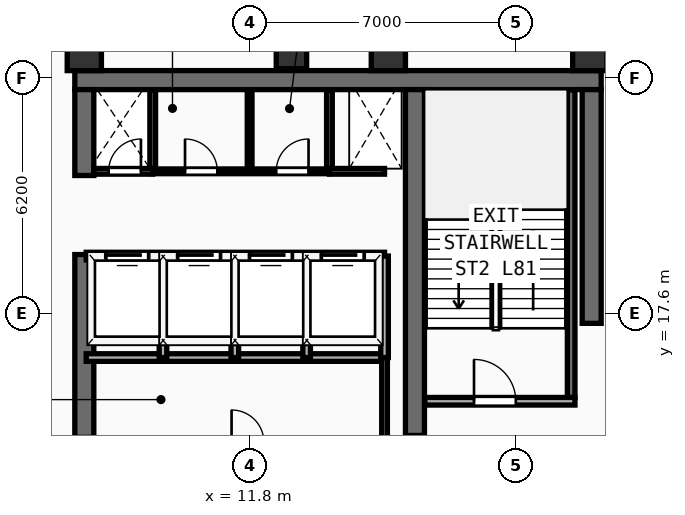
"""IFC4 building model, lengths in metres.
Left out: names, types, materials, properties, quantities, classifications, styles, units other than length and angle.
Written with IfcOpenShell. Run it as: python <this file> out.ifc"""

import sys

from ifc_helpers import new_model, si_unit, direction, frame, frame_2d, origin, origin_2d, place, context, subcontext, project, spatial, rectangle, extrude, element, fill, save


model = new_model("IFC4")
c1 = context("Model", 3, precision=1e-05, world=origin(), true_north=direction((0.0, 1.0)))
c2 = subcontext(c1, "Body", "Model", "MODEL_VIEW")
j1 = project(units=[si_unit("LENGTHUNIT", "METRE"), si_unit("PLANEANGLEUNIT", "RADIAN")], contexts=[c1])
p1 = place(None, origin())
s1 = spatial("IfcSite", under=j1, at=p1, CompositionType="ELEMENT")
p2 = place(p1, origin())
s2 = spatial("IfcBuilding", under=s1, at=p2, CompositionType="ELEMENT")
p3 = place(p2, frame((0.0, 0.0, 316.0)))
s3 = spatial("IfcBuildingStorey", under=s2, at=p3, CompositionType="ELEMENT", Elevation=316.0)
p4 = place(p3, frame((7.2, 23.75, 0.0), z_axis=(0.0, 0.0, 1.0), x_axis=(1.0, 0.0, 0.0)))
e1 = element("IfcWall", 1, at=p4, inside=s3, PredefinedType="SHEAR", context=c2, shape_type="SweptSolid", body=[
    extrude(rectangle(XDim=13.85, YDim=0.5, at=frame_2d((6.925, 0.0))), origin(), (0.0, 0.0, 1.0), 3.56),
])
p5 = place(p3, frame((7.45, 14.35, 0.0), z_axis=(0.0, 0.0, 1.0), x_axis=(0.0, 1.0, 0.0)))
e2 = element("IfcWall", 2, at=p5, inside=s3, PredefinedType="SHEAR", context=c2, shape_type="SweptSolid", body=[
    extrude(rectangle(XDim=4.81, YDim=0.5, at=frame_2d((2.405, 0.0))), origin(), (0.0, 0.0, 1.0), 3.56),
])
p6 = place(p3, frame((7.45, 21.24, 0.0), z_axis=(0.0, 0.0, 1.0), x_axis=(0.0, 1.0, 0.0)))
e3 = element("IfcWall", 3, at=p6, inside=s3, PredefinedType="SHEAR", context=c2, shape_type="SweptSolid", body=[
    extrude(rectangle(XDim=2.26, YDim=0.5, at=frame_2d((1.13, 0.0))), origin(), (0.0, 0.0, 1.0), 3.56),
])
p7 = place(p3, frame((20.8, 17.35, 0.0), z_axis=(0.0, 0.0, 1.0), x_axis=(0.0, 1.0, 0.0)))
e4 = element("IfcWall", 4, at=p7, inside=s3, PredefinedType="SHEAR", context=c2, shape_type="SweptSolid", body=[
    extrude(rectangle(XDim=6.15, YDim=0.5, at=frame_2d((3.075, 0.0))), origin(), (0.0, 0.0, 1.0), 3.56),
])
p8 = place(p3, frame((16.15, 14.4, 0.0), z_axis=(0.0, 0.0, 1.0), x_axis=(0.0, 1.0, 0.0)))
e5 = element("IfcWall", 5, at=p8, inside=s3, PredefinedType="SHEAR", context=c2, shape_type="SweptSolid", body=[
    extrude(rectangle(XDim=9.1, YDim=0.5, at=frame_2d((4.55, 0.0))), origin(), (0.0, 0.0, 1.0), 3.56),
])
for number, where, z_axis, x_axis in (
    (6, (7.45, 24.45, 0.0), (0.0, 0.0, 1.0), (1.0, 0.0, 0.0)),
    (7, (15.45, 24.45, 0.0), (0.0, 0.0, 1.0), (1.0, 0.0, 0.0)),
    (8, (20.75, 24.45, 0.0), (0.0, 0.0, 1.0), (1.0, 0.0, 0.0)),
):
    element("IfcColumn", number, at=place(p3, frame(where, z_axis=z_axis, x_axis=x_axis)), inside=s3, PredefinedType="COLUMN", context=c2, shape_type="SweptSolid", body=[
        extrude(rectangle(XDim=0.9, YDim=0.9, at=origin_2d()), origin(), (0.0, 0.0, 1.0), 3.56),
    ])
p9 = place(p3, frame((12.9, 24.45, 0.0), z_axis=(0.0, 0.0, 1.0), x_axis=(1.0, 0.0, 0.0)))
e9 = element("IfcColumn", 9, at=p9, inside=s3, PredefinedType="COLUMN", context=c2, shape_type="SweptSolid", body=[
    extrude(rectangle(XDim=0.8, YDim=0.8, at=origin_2d()), origin(), (0.0, 0.0, 1.0), 3.56),
])
p10 = place(p3, frame((27.538, 19.628, 0.0), z_axis=(0.0, 0.0, 1.0), x_axis=(-0.707106781187, 0.707106781187, 0.0)))
e10 = element("IfcWall", 10, at=p10, inside=s3, PredefinedType="SOLIDWALL", context=c2, shape_type="SweptSolid", body=[
    extrude(rectangle(XDim=9.207, YDim=0.28, at=frame_2d((4.603, 0.0))), origin(), (0.0, 0.0, 1.0), 3.56),
])
p11 = place(p3, frame((20.26, 15.4, 0.0), z_axis=(0.0, 0.0, 1.0), x_axis=(0.0, 1.0, 0.0)))
e11 = element("IfcWall", 11, at=p11, inside=s3, PredefinedType="SHEAR", context=c2, shape_type="SweptSolid", body=[
    extrude(rectangle(XDim=8.09, YDim=0.2, at=frame_2d((4.045, 0.0))), origin(), (0.0, 0.0, 1.0), 3.56),
])
p12 = place(p3, frame((16.41, 15.3, 0.0), z_axis=(0.0, 0.0, 1.0), x_axis=(1.0, 0.0, 0.0)))
e12 = element("IfcWall", 12, at=p12, inside=s3, PredefinedType="PARTITIONING", context=c2, shape_type="SweptSolid", body=[
    extrude(rectangle(XDim=3.95, YDim=0.2, at=frame_2d((1.975, 0.0))), origin(), (0.0, 0.0, 1.0), 3.56),
])
p13 = place(p12, frame((1.294, 0.0, 0.0)))
e13 = element("IfcOpeningElement", 13, at=p13, cuts=e12, PredefinedType="OPENING", context=c2, shape_type="SweptSolid", body=[
    extrude(rectangle(XDim=1.1, YDim=2.2, at=frame_2d((0.55, 1.1))), frame((0.0, 0.11, 0.0), z_axis=(0.0, -1.0, 0.0), x_axis=(1.0, 0.0, 0.0)), (0.0, 0.0, 1.0), 0.22),
])
p14 = place(p3, frame((7.5, 16.45, 0.0), z_axis=(0.0, 0.0, 1.0), x_axis=(1.0, 0.0, 0.0)))
e14 = element("IfcWall", 14, at=p14, inside=s3, PredefinedType="PARTITIONING", context=c2, shape_type="SweptSolid", body=[
    extrude(rectangle(XDim=7.85, YDim=0.2, at=frame_2d((3.925, 0.0))), origin(), (0.0, 0.0, 1.0), 3.56),
])
p15 = place(p3, frame((15.35, 14.22, 0.0), z_axis=(0.0, 0.0, 1.0), x_axis=(0.0, 1.0, 0.0)))
e15 = element("IfcWall", 15, at=p15, inside=s3, PredefinedType="PARTITIONING", context=c2, shape_type="SweptSolid", body=[
    extrude(rectangle(XDim=2.23, YDim=0.15, at=frame_2d((1.115, 0.0))), origin(), (0.0, 0.0, 1.0), 3.56),
])
p16 = place(p3, frame((7.5, 19.12, 0.0), z_axis=(0.0, 0.0, 1.0), x_axis=(1.0, 0.0, 0.0)))
e16 = element("IfcWall", 16, at=p16, inside=s3, PredefinedType="PARTITIONING", context=c2, shape_type="SweptSolid", body=[
    extrude(rectangle(XDim=7.85, YDim=0.2, at=frame_2d((3.925, 0.0))), origin(), (0.0, 0.0, 1.0), 3.56),
])
p17 = place(p16, frame((0.53, 0.0, 0.0)))
e17 = element("IfcOpeningElement", 17, at=p17, cuts=e16, PredefinedType="OPENING", context=c2, shape_type="SweptSolid", body=[
    extrude(rectangle(XDim=1.1, YDim=2.2, at=frame_2d((0.55, 1.1))), frame((0.0, 0.11, 0.0), z_axis=(0.0, -1.0, 0.0), x_axis=(1.0, 0.0, 0.0)), (0.0, 0.0, 1.0), 0.22),
])
p18 = place(p16, frame((2.42, 0.0, 0.0)))
e18 = element("IfcOpeningElement", 18, at=p18, cuts=e16, PredefinedType="OPENING", context=c2, shape_type="SweptSolid", body=[
    extrude(rectangle(XDim=1.1, YDim=2.2, at=frame_2d((0.55, 1.1))), frame((0.0, 0.11, 0.0), z_axis=(0.0, -1.0, 0.0), x_axis=(1.0, 0.0, 0.0)), (0.0, 0.0, 1.0), 0.22),
])
p19 = place(p16, frame((4.31, 0.0, 0.0)))
e19 = element("IfcOpeningElement", 19, at=p19, cuts=e16, PredefinedType="OPENING", context=c2, shape_type="SweptSolid", body=[
    extrude(rectangle(XDim=1.1, YDim=2.2, at=frame_2d((0.55, 1.1))), frame((0.0, 0.11, 0.0), z_axis=(0.0, -1.0, 0.0), x_axis=(1.0, 0.0, 0.0)), (0.0, 0.0, 1.0), 0.22),
])
p20 = place(p16, frame((6.2, 0.0, 0.0)))
e20 = element("IfcOpeningElement", 20, at=p20, cuts=e16, PredefinedType="OPENING", context=c2, shape_type="SweptSolid", body=[
    extrude(rectangle(XDim=1.1, YDim=2.2, at=frame_2d((0.55, 1.1))), frame((0.0, 0.11, 0.0), z_axis=(0.0, -1.0, 0.0), x_axis=(1.0, 0.0, 0.0)), (0.0, 0.0, 1.0), 0.22),
])
for number, where, z_axis, x_axis in (
    (21, (15.35, 16.45, 0.0), (0.0, 0.0, 1.0), (0.0, 1.0, 0.0)),
    (22, (9.52, 16.45, 0.0), (0.0, 0.0, 1.0), (0.0, 1.0, 0.0)),
    (23, (11.41, 16.45, 0.0), (0.0, 0.0, 1.0), (0.0, 1.0, 0.0)),
    (24, (13.3, 16.45, 0.0), (0.0, 0.0, 1.0), (0.0, 1.0, 0.0)),
):
    element("IfcWall", number, at=place(p3, frame(where, z_axis=z_axis, x_axis=x_axis)), inside=s3, PredefinedType="PARTITIONING", context=c2, shape_type="SweptSolid", body=[
        extrude(rectangle(XDim=2.67, YDim=0.2, at=frame_2d((1.335, 0.0))), origin(), (0.0, 0.0, 1.0), 3.56),
    ])
for number, where, z_axis, x_axis in (
    (25, (9.25, 21.35, 0.0), (0.0, 0.0, 1.0), (0.0, 1.0, 0.0)),
    (26, (13.9, 21.35, 0.0), (0.0, 0.0, 1.0), (0.0, 1.0, 0.0)),
):
    element("IfcWall", number, at=place(p3, frame(where, z_axis=z_axis, x_axis=x_axis)), inside=s3, PredefinedType="PARTITIONING", context=c2, shape_type="SweptSolid", body=[
        extrude(rectangle(XDim=2.13, YDim=0.15, at=frame_2d((1.065, 0.0))), origin(), (0.0, 0.0, 1.0), 3.56),
    ])
p21 = place(p3, frame((7.7, 21.35, 0.0), z_axis=(0.0, 0.0, 1.0), x_axis=(1.0, 0.0, 0.0)))
e27 = element("IfcWall", 27, at=p21, inside=s3, PredefinedType="PARTITIONING", context=c2, shape_type="SweptSolid", body=[
    extrude(rectangle(XDim=1.55, YDim=0.15, at=frame_2d((0.775, 0.0))), origin(), (0.0, 0.0, 1.0), 3.56),
])
p22 = place(p21, frame((0.39, 0.0, 0.0)))
e28 = element("IfcOpeningElement", 28, at=p22, cuts=e27, PredefinedType="OPENING", context=c2, shape_type="SweptSolid", body=[
    extrude(rectangle(XDim=0.85, YDim=2.15, at=frame_2d((0.425, 1.075))), frame((0.0, 0.085, 0.0), z_axis=(0.0, -1.0, 0.0), x_axis=(1.0, 0.0, 0.0)), (0.0, 0.0, 1.0), 0.17),
])
p23 = place(p3, frame((13.9, 21.35, 0.0), z_axis=(0.0, 0.0, 1.0), x_axis=(1.0, 0.0, 0.0)))
e29 = element("IfcWall", 29, at=p23, inside=s3, PredefinedType="PARTITIONING", context=c2, shape_type="SweptSolid", body=[
    extrude(rectangle(XDim=1.45, YDim=0.15, at=frame_2d((0.725, 0.0))), origin(), (0.0, 0.0, 1.0), 3.56),
])
p24 = place(p3, frame((9.25, 21.35, 0.0), z_axis=(0.0, 0.0, 1.0), x_axis=(1.0, 0.0, 0.0)))
e30 = element("IfcWall", 30, at=p24, inside=s3, PredefinedType="PARTITIONING", context=c2, shape_type="SweptSolid", body=[
    extrude(rectangle(XDim=4.65, YDim=0.125, at=frame_2d((2.325, 0.0))), origin(), (0.0, 0.0, 1.0), 3.56),
])
p25 = place(p24, frame((0.85, 0.0, 0.0)))
e31 = element("IfcOpeningElement", 31, at=p25, cuts=e30, PredefinedType="OPENING", context=c2, shape_type="SweptSolid", body=[
    extrude(rectangle(XDim=0.85, YDim=2.15, at=frame_2d((0.425, 1.075))), frame((0.0, 0.073, 0.0), z_axis=(0.0, -1.0, 0.0), x_axis=(1.0, 0.0, 0.0)), (0.0, 0.0, 1.0), 0.145),
])
p26 = place(p24, frame((3.25, 0.0, 0.0)))
e32 = element("IfcOpeningElement", 32, at=p26, cuts=e30, PredefinedType="OPENING", context=c2, shape_type="SweptSolid", body=[
    extrude(rectangle(XDim=0.85, YDim=2.15, at=frame_2d((0.425, 1.075))), frame((0.0, 0.073, 0.0), z_axis=(0.0, -1.0, 0.0), x_axis=(1.0, 0.0, 0.0)), (0.0, 0.0, 1.0), 0.145),
])
p27 = place(p3, frame((11.8, 21.35, 0.0), z_axis=(0.0, 0.0, 1.0), x_axis=(0.0, 1.0, 0.0)))
e33 = element("IfcWall", 33, at=p27, inside=s3, PredefinedType="PARTITIONING", context=c2, shape_type="SweptSolid", body=[
    extrude(rectangle(XDim=2.13, YDim=0.125, at=frame_2d((1.065, 0.0))), origin(), (0.0, 0.0, 1.0), 3.56),
])
p28 = place(p13, origin())
e34 = element("IfcDoor", 34, at=p28, inside=s3, OperationType="SINGLE_SWING_LEFT", PredefinedType="DOOR", context=c2, shape_type="SweptSolid", body=[
    extrude(rectangle(XDim=1.1, YDim=2.2, at=frame_2d((0.55, 1.1))), frame((0.0, 0.025, 0.0), z_axis=(0.0, -1.0, 0.0), x_axis=(1.0, 0.0, 0.0)), (0.0, 0.0, 1.0), 0.05),
])
fill(e13, e34)
p29 = place(p17, origin())
e35 = element("IfcDoor", 35, at=p29, inside=s3, OperationType="SLIDING_TO_LEFT", PredefinedType="DOOR", context=c2, shape_type="SweptSolid", body=[
    extrude(rectangle(XDim=1.1, YDim=2.2, at=frame_2d((0.55, 1.1))), frame((0.0, 0.025, 0.0), z_axis=(0.0, -1.0, 0.0), x_axis=(1.0, 0.0, 0.0)), (0.0, 0.0, 1.0), 0.05),
])
fill(e17, e35)
p30 = place(p18, origin())
e36 = element("IfcDoor", 36, at=p30, inside=s3, OperationType="SLIDING_TO_LEFT", PredefinedType="DOOR", context=c2, shape_type="SweptSolid", body=[
    extrude(rectangle(XDim=1.1, YDim=2.2, at=frame_2d((0.55, 1.1))), frame((0.0, 0.025, 0.0), z_axis=(0.0, -1.0, 0.0), x_axis=(1.0, 0.0, 0.0)), (0.0, 0.0, 1.0), 0.05),
])
fill(e18, e36)
p31 = place(p19, origin())
e37 = element("IfcDoor", 37, at=p31, inside=s3, OperationType="SLIDING_TO_LEFT", PredefinedType="DOOR", context=c2, shape_type="SweptSolid", body=[
    extrude(rectangle(XDim=1.1, YDim=2.2, at=frame_2d((0.55, 1.1))), frame((0.0, 0.025, 0.0), z_axis=(0.0, -1.0, 0.0), x_axis=(1.0, 0.0, 0.0)), (0.0, 0.0, 1.0), 0.05),
])
fill(e19, e37)
p32 = place(p20, origin())
e38 = element("IfcDoor", 38, at=p32, inside=s3, OperationType="SLIDING_TO_LEFT", PredefinedType="DOOR", context=c2, shape_type="SweptSolid", body=[
    extrude(rectangle(XDim=1.1, YDim=2.2, at=frame_2d((0.55, 1.1))), frame((0.0, 0.025, 0.0), z_axis=(0.0, -1.0, 0.0), x_axis=(1.0, 0.0, 0.0)), (0.0, 0.0, 1.0), 0.05),
])
fill(e20, e38)
p33 = place(p22, origin())
e39 = element("IfcDoor", 39, at=p33, inside=s3, OperationType="SINGLE_SWING_RIGHT", PredefinedType="DOOR", context=c2, shape_type="SweptSolid", body=[
    extrude(rectangle(XDim=0.85, YDim=2.15, at=frame_2d((0.425, 1.075))), frame((0.0, 0.025, 0.0), z_axis=(0.0, -1.0, 0.0), x_axis=(1.0, 0.0, 0.0)), (0.0, 0.0, 1.0), 0.05),
])
fill(e28, e39)
p34 = place(p25, origin())
e40 = element("IfcDoor", 40, at=p34, inside=s3, OperationType="SINGLE_SWING_LEFT", PredefinedType="DOOR", context=c2, shape_type="SweptSolid", body=[
    extrude(rectangle(XDim=0.85, YDim=2.15, at=frame_2d((0.425, 1.075))), frame((0.0, 0.025, 0.0), z_axis=(0.0, -1.0, 0.0), x_axis=(1.0, 0.0, 0.0)), (0.0, 0.0, 1.0), 0.05),
])
fill(e31, e40)
p35 = place(p26, origin())
e41 = element("IfcDoor", 41, at=p35, inside=s3, OperationType="SINGLE_SWING_RIGHT", PredefinedType="DOOR", context=c2, shape_type="SweptSolid", body=[
    extrude(rectangle(XDim=0.85, YDim=2.15, at=frame_2d((0.425, 1.075))), frame((0.0, 0.025, 0.0), z_axis=(0.0, -1.0, 0.0), x_axis=(1.0, 0.0, 0.0)), (0.0, 0.0, 1.0), 0.05),
])
fill(e32, e41)
save(model, sys.argv[1])
